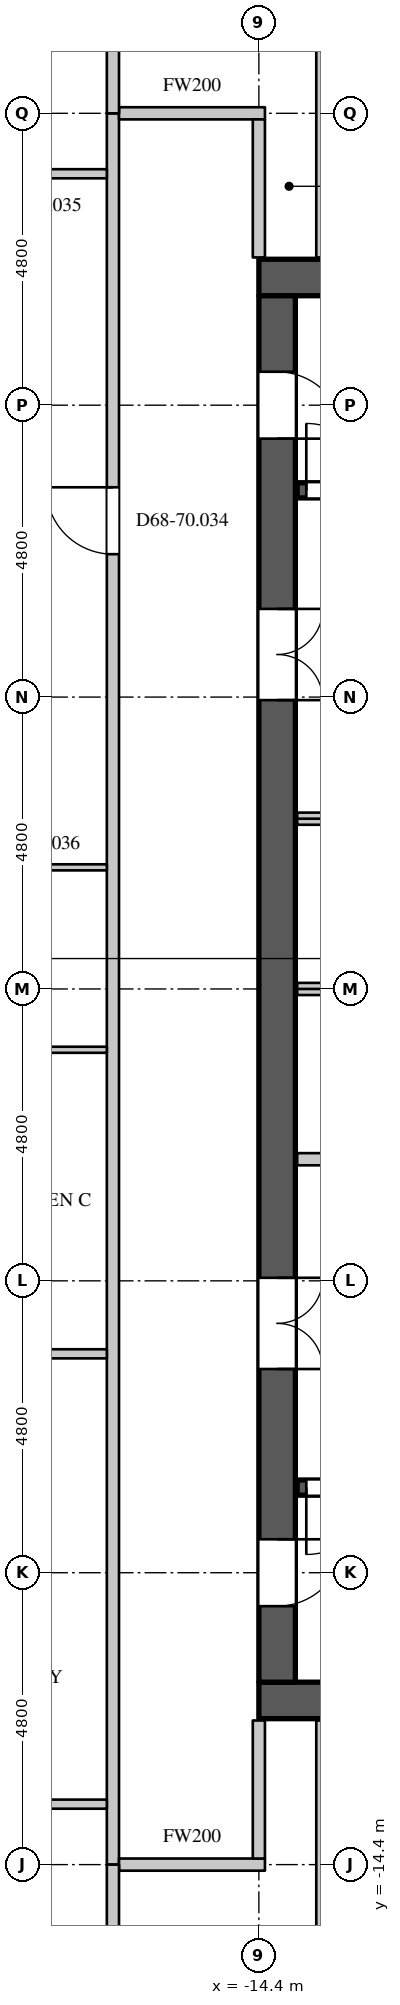
"""IFC4 building model, lengths in metres.
Left out: names, types, materials, properties, quantities, classifications, styles, units other than length and angle.
Written with IfcOpenShell. Run it as: python <this file> out.ifc"""

import sys

from ifc_helpers import new_model, si_unit, direction, frame, frame_2d, origin, place, context, subcontext, project, spatial, rectangle, extrude, element, fill, save


model = new_model("IFC4")
c1 = context("Model", 3, precision=1e-05, world=origin(), true_north=direction((0.0, 1.0)))
c2 = subcontext(c1, "Body", "Model", "MODEL_VIEW")
j1 = project(units=[si_unit("LENGTHUNIT", "METRE"), si_unit("PLANEANGLEUNIT", "RADIAN")], contexts=[c1])
p1 = place(None, origin())
s1 = spatial("IfcSite", under=j1, at=p1, CompositionType="ELEMENT")
p2 = place(p1, origin())
s2 = spatial("IfcBuilding", under=s1, at=p2, CompositionType="ELEMENT")
p3 = place(p2, frame((0.0, 0.0, 293.7)))
s3 = spatial("IfcBuildingStorey", under=s2, at=p3, CompositionType="ELEMENT", Elevation=293.7)
for number, where, z_axis, x_axis in (
    (1, (-14.4, 11.7, 0.0), (0.0, 0.0, 1.0), (1.0, 0.0, 0.0)),
    (2, (-14.4, -11.7, 0.0), (0.0, 0.0, 1.0), (1.0, 0.0, 0.0)),
):
    element("IfcWall", number, at=place(p3, frame(where, z_axis=z_axis, x_axis=x_axis)), inside=s3, PredefinedType="SHEAR", context=c2, shape_type="SweptSolid", body=[
        extrude(rectangle(XDim=28.8, YDim=0.6, at=frame_2d((14.4, 0.0))), origin(), (0.0, 0.0, 1.0), 4.2),
    ])
p4 = place(p3, frame((-14.1, -11.4, 0.0), z_axis=(0.0, 0.0, 1.0), x_axis=(0.0, 1.0, 0.0)))
e3 = element("IfcWall", 3, at=p4, inside=s3, PredefinedType="SHEAR", context=c2, shape_type="SweptSolid", body=[
    extrude(rectangle(XDim=22.8, YDim=0.6, at=frame_2d((11.4, 0.0))), origin(), (0.0, 0.0, 1.0), 4.2),
])
p5 = place(p4, frame((20.45, 0.0, 0.0)))
e4 = element("IfcOpeningElement", 4, at=p5, cuts=e3, PredefinedType="OPENING", context=c2, shape_type="SweptSolid", body=[
    extrude(rectangle(XDim=1.1, YDim=2.2, at=frame_2d((0.55, 1.1))), frame((0.0, 0.31, 0.0), z_axis=(0.0, -1.0, 0.0), x_axis=(1.0, 0.0, 0.0)), (0.0, 0.0, 1.0), 0.62),
])
p6 = place(p4, frame((1.25, 0.0, 0.0)))
e5 = element("IfcOpeningElement", 5, at=p6, cuts=e3, PredefinedType="OPENING", context=c2, shape_type="SweptSolid", body=[
    extrude(rectangle(XDim=1.1, YDim=2.2, at=frame_2d((0.55, 1.1))), frame((0.0, 0.31, 0.0), z_axis=(0.0, -1.0, 0.0), x_axis=(1.0, 0.0, 0.0)), (0.0, 0.0, 1.0), 0.62),
])
p7 = place(p4, frame((16.15, 0.0, 0.0)))
e6 = element("IfcOpeningElement", 6, at=p7, cuts=e3, PredefinedType="OPENING", context=c2, shape_type="SweptSolid", body=[
    extrude(rectangle(XDim=1.5, YDim=2.4, at=frame_2d((0.75, 1.2))), frame((0.0, 0.31, 0.0), z_axis=(0.0, -1.0, 0.0), x_axis=(1.0, 0.0, 0.0)), (0.0, 0.0, 1.0), 0.62),
])
p8 = place(p4, frame((5.15, 0.0, 0.0)))
e7 = element("IfcOpeningElement", 7, at=p8, cuts=e3, PredefinedType="OPENING", context=c2, shape_type="SweptSolid", body=[
    extrude(rectangle(XDim=1.5, YDim=2.4, at=frame_2d((0.75, 1.2))), frame((0.0, 0.31, 0.0), z_axis=(0.0, -1.0, 0.0), x_axis=(1.0, 0.0, 0.0)), (0.0, 0.0, 1.0), 0.62),
])
p9 = place(p3, frame((-16.8, -14.4, 0.0), z_axis=(0.0, 0.0, 1.0), x_axis=(0.0, 1.0, 0.0)))
e8 = element("IfcWall", 8, at=p9, inside=s3, PredefinedType="PARTITIONING", context=c2, shape_type="SweptSolid", body=[
    extrude(rectangle(XDim=28.8, YDim=0.2, at=frame_2d((14.4, 0.0))), origin(), (0.0, 0.0, 1.0), 3.95),
])
p10 = place(p9, frame((21.55, 0.0, 0.0)))
e9 = element("IfcOpeningElement", 9, at=p10, cuts=e8, PredefinedType="OPENING", context=c2, shape_type="SweptSolid", body=[
    extrude(rectangle(XDim=1.1, YDim=2.4, at=frame_2d((0.55, 1.2))), frame((0.0, 0.11, 0.0), z_axis=(0.0, -1.0, 0.0), x_axis=(1.0, 0.0, 0.0)), (0.0, 0.0, 1.0), 0.22),
])
for number, where, z_axis, x_axis in (
    (10, (-16.7, -14.4, 0.0), (0.0, 0.0, 1.0), (1.0, 0.0, 0.0)),
    (11, (-16.7, 14.4, 0.0), (0.0, 0.0, 1.0), (1.0, 0.0, 0.0)),
):
    element("IfcWall", number, at=place(p3, frame(where, z_axis=z_axis, x_axis=x_axis)), inside=s3, PredefinedType="PARTITIONING", context=c2, shape_type="SweptSolid", body=[
        extrude(rectangle(XDim=2.4, YDim=0.2, at=frame_2d((1.2, 0.0))), origin(), (0.0, 0.0, 1.0), 3.95),
    ])
for number, where, z_axis, x_axis in (
    (12, (-14.4, -14.3, 0.0), (0.0, 0.0, 1.0), (0.0, 1.0, 0.0)),
    (13, (-14.4, 12.03, 0.0), (0.0, 0.0, 1.0), (0.0, 1.0, 0.0)),
):
    element("IfcWall", number, at=place(p3, frame(where, z_axis=z_axis, x_axis=x_axis)), inside=s3, PredefinedType="PARTITIONING", context=c2, shape_type="SweptSolid", body=[
        extrude(rectangle(XDim=2.27, YDim=0.2, at=frame_2d((1.135, 0.0))), origin(), (0.0, 0.0, 1.0), 3.95),
    ])
p11 = place(p3, frame((-25.224, -13.406, 0.0), z_axis=(0.0, 0.0, 1.0), x_axis=(1.0, 0.0, 0.0)))
e14 = element("IfcWall", 14, at=p11, inside=s3, PredefinedType="PARTITIONING", context=c2, shape_type="SweptSolid", body=[
    extrude(rectangle(XDim=8.324, YDim=0.15, at=frame_2d((4.162, 0.0))), origin(), (0.0, 0.0, 1.0), 3.95),
])
p12 = place(p11, frame((1.793, 0.0, 0.0)))
e15 = element("IfcOpeningElement", 15, at=p12, cuts=e14, PredefinedType="OPENING", context=c2, shape_type="SweptSolid", body=[
    extrude(rectangle(XDim=1.5, YDim=2.2, at=frame_2d((0.75, 1.1))), frame((0.0, 0.085, 0.0), z_axis=(0.0, -1.0, 0.0), x_axis=(1.0, 0.0, 0.0)), (0.0, 0.0, 1.0), 0.17),
])
p13 = place(p3, frame((-25.224, 13.406, 0.0), z_axis=(0.0, 0.0, 1.0), x_axis=(1.0, 0.0, 0.0)))
e16 = element("IfcWall", 16, at=p13, inside=s3, PredefinedType="PARTITIONING", context=c2, shape_type="SweptSolid", body=[
    extrude(rectangle(XDim=8.324, YDim=0.15, at=frame_2d((4.162, 0.0))), origin(), (0.0, 0.0, 1.0), 3.95),
])
p14 = place(p13, frame((6.143, 0.0, 0.0)))
e17 = element("IfcOpeningElement", 17, at=p14, cuts=e16, PredefinedType="OPENING", context=c2, shape_type="SweptSolid", body=[
    extrude(rectangle(XDim=0.95, YDim=2.2, at=frame_2d((0.475, 1.1))), frame((0.0, 0.085, 0.0), z_axis=(0.0, -1.0, 0.0), x_axis=(1.0, 0.0, 0.0)), (0.0, 0.0, 1.0), 0.17),
])
p15 = place(p3, frame((-19.675, -6.0, 0.0), z_axis=(0.0, 0.0, 1.0), x_axis=(1.0, 0.0, 0.0)))
e18 = element("IfcWall", 18, at=p15, inside=s3, PredefinedType="PARTITIONING", context=c2, shape_type="SweptSolid", body=[
    extrude(rectangle(XDim=2.775, YDim=0.15, at=frame_2d((1.388, 0.0))), origin(), (0.0, 0.0, 1.0), 3.95),
])
for number, where, z_axis, x_axis in (
    (19, (-16.8, -19.803, 0.0), (0.0, 0.0, 1.0), (0.0, 1.0, 0.0)),
    (20, (-16.8, 14.4, 0.0), (0.0, 0.0, 1.0), (0.0, 1.0, 0.0)),
):
    element("IfcWall", number, at=place(p3, frame(where, z_axis=z_axis, x_axis=x_axis)), inside=s3, PredefinedType="PARTITIONING", context=c2, shape_type="SweptSolid", body=[
        extrude(rectangle(XDim=5.403, YDim=0.2, at=frame_2d((2.702, 0.0))), origin(), (0.0, 0.0, 1.0), 3.95),
    ])
p16 = place(p3, frame((-13.77, -2.8, 0.0), z_axis=(0.0, 0.0, 1.0), x_axis=(1.0, 0.0, 0.0)))
e21 = element("IfcWall", 21, at=p16, inside=s3, PredefinedType="PARTITIONING", context=c2, shape_type="SweptSolid", body=[
    extrude(rectangle(XDim=3.37, YDim=0.2, at=frame_2d((1.685, 0.0))), origin(), (0.0, 0.0, 1.0), 3.95),
])
p17 = place(p16, frame((1.35, 0.0, 0.0)))
e22 = element("IfcOpeningElement", 22, at=p17, cuts=e21, PredefinedType="OPENING", context=c2, shape_type="SweptSolid", body=[
    extrude(rectangle(XDim=0.6, YDim=2.0, at=frame_2d((0.3, 1.0))), frame((0.0, 0.11, 0.0), z_axis=(0.0, -1.0, 0.0), x_axis=(1.0, 0.0, 0.0)), (0.0, 0.0, 1.0), 0.22),
])
p18 = place(p3, frame((-13.77, 0.0, 0.0), z_axis=(0.0, 0.0, 1.0), x_axis=(1.0, 0.0, 0.0)))
e23 = element("IfcWall", 23, at=p18, inside=s3, PredefinedType="PARTITIONING", context=c2, shape_type="SweptSolid", body=[
    extrude(rectangle(XDim=21.57, YDim=0.2, at=frame_2d((10.785, 0.0))), origin(), (0.0, 0.0, 1.0), 3.95),
])
p19 = place(p3, frame((-13.77, 2.8, 0.0), z_axis=(0.0, 0.0, 1.0), x_axis=(1.0, 0.0, 0.0)))
e24 = element("IfcWall", 24, at=p19, inside=s3, PredefinedType="PARTITIONING", context=c2, shape_type="SweptSolid", body=[
    extrude(rectangle(XDim=5.95, YDim=0.2, at=frame_2d((2.975, 0.0))), origin(), (0.0, 0.0, 1.0), 3.95),
])
p20 = place(p19, frame((1.1, 0.0, 0.0)))
e25 = element("IfcOpeningElement", 25, at=p20, cuts=e24, PredefinedType="OPENING", context=c2, shape_type="SweptSolid", body=[
    extrude(rectangle(XDim=1.1, YDim=2.2, at=frame_2d((0.55, 1.1))), frame((0.0, 0.11, 0.0), z_axis=(0.0, -1.0, 0.0), x_axis=(1.0, 0.0, 0.0)), (0.0, 0.0, 1.0), 0.22),
])
p21 = place(p19, frame((4.1, 0.0, 0.0)))
e26 = element("IfcOpeningElement", 26, at=p21, cuts=e24, PredefinedType="OPENING", context=c2, shape_type="SweptSolid", body=[
    extrude(rectangle(XDim=1.1, YDim=2.2, at=frame_2d((0.55, 1.1))), frame((0.0, 0.11, 0.0), z_axis=(0.0, -1.0, 0.0), x_axis=(1.0, 0.0, 0.0)), (0.0, 0.0, 1.0), 0.22),
])
p22 = place(p3, frame((-13.77, -8.2, 0.0), z_axis=(0.0, 0.0, 1.0), x_axis=(1.0, 0.0, 0.0)))
e27 = element("IfcWall", 27, at=p22, inside=s3, PredefinedType="SHEAR", context=c2, shape_type="SweptSolid", body=[
    extrude(rectangle(XDim=8.495, YDim=0.25, at=frame_2d((4.248, 0.0))), origin(), (0.0, 0.0, 1.0), 3.95),
])
p23 = place(p22, frame((0.15, 0.0, 0.0)))
e28 = element("IfcOpeningElement", 28, at=p23, cuts=e27, PredefinedType="OPENING", context=c2, shape_type="SweptSolid", body=[
    extrude(rectangle(XDim=1.1, YDim=2.2, at=frame_2d((0.55, 1.1))), frame((0.0, 0.135, 0.0), z_axis=(0.0, -1.0, 0.0), x_axis=(1.0, 0.0, 0.0)), (0.0, 0.0, 1.0), 0.27),
])
p24 = place(p3, frame((-13.77, 8.2, 0.0), z_axis=(0.0, 0.0, 1.0), x_axis=(1.0, 0.0, 0.0)))
e29 = element("IfcWall", 29, at=p24, inside=s3, PredefinedType="SHEAR", context=c2, shape_type="SweptSolid", body=[
    extrude(rectangle(XDim=8.495, YDim=0.25, at=frame_2d((4.248, 0.0))), origin(), (0.0, 0.0, 1.0), 3.95),
])
p25 = place(p24, frame((0.15, 0.0, 0.0)))
e30 = element("IfcOpeningElement", 30, at=p25, cuts=e29, PredefinedType="OPENING", context=c2, shape_type="SweptSolid", body=[
    extrude(rectangle(XDim=1.1, YDim=2.2, at=frame_2d((0.55, 1.1))), frame((0.0, 0.135, 0.0), z_axis=(0.0, -1.0, 0.0), x_axis=(1.0, 0.0, 0.0)), (0.0, 0.0, 1.0), 0.27),
])
p26 = place(p3, frame((-20.625, -1.0, 0.0), z_axis=(0.0, 0.0, 1.0), x_axis=(1.0, 0.0, 0.0)))
e31 = element("IfcWall", 31, at=p26, inside=s3, PredefinedType="PARTITIONING", context=c2, shape_type="SweptSolid", body=[
    extrude(rectangle(XDim=3.725, YDim=0.1, at=frame_2d((1.863, 0.0))), origin(), (0.0, 0.0, 1.0), 3.95),
])
p27 = place(p3, frame((-20.65, 2.0, 0.0), z_axis=(0.0, 0.0, 1.0), x_axis=(1.0, 0.0, 0.0)))
e32 = element("IfcWall", 32, at=p27, inside=s3, PredefinedType="PARTITIONING", context=c2, shape_type="SweptSolid", body=[
    extrude(rectangle(XDim=3.75, YDim=0.1, at=frame_2d((1.875, 0.0))), origin(), (0.0, 0.0, 1.0), 3.95),
])
p28 = place(p27, frame((1.45, 0.0, 0.0)))
e33 = element("IfcOpeningElement", 33, at=p28, cuts=e32, PredefinedType="OPENING", context=c2, shape_type="SweptSolid", body=[
    extrude(rectangle(XDim=0.9, YDim=2.2, at=frame_2d((0.45, 1.1))), frame((0.0, 0.06, 0.0), z_axis=(0.0, -1.0, 0.0), x_axis=(1.0, 0.0, 0.0)), (0.0, 0.0, 1.0), 0.12),
])
for number, where, z_axis, x_axis in (
    (34, (-13.406, -16.6, 0.0), (0.0, 0.0, 1.0), (0.0, 1.0, 0.0)),
    (35, (-13.406, 12.03, 0.0), (0.0, 0.0, 1.0), (0.0, 1.0, 0.0)),
):
    element("IfcWall", number, at=place(p3, frame(where, z_axis=z_axis, x_axis=x_axis)), inside=s3, PredefinedType="PARTITIONING", context=c2, shape_type="SweptSolid", body=[
        extrude(rectangle(XDim=4.57, YDim=0.1, at=frame_2d((2.285, 0.0))), origin(), (0.0, 0.0, 1.0), 3.3),
    ])
p29 = place(p25, origin())
e36 = element("IfcDoor", 36, at=p29, inside=s3, OperationType="SINGLE_SWING_LEFT", PredefinedType="DOOR", context=c2, shape_type="SweptSolid", body=[
    extrude(rectangle(XDim=1.1, YDim=2.2, at=frame_2d((0.55, 1.1))), frame((0.0, 0.025, 0.0), z_axis=(0.0, -1.0, 0.0), x_axis=(1.0, 0.0, 0.0)), (0.0, 0.0, 1.0), 0.05),
])
fill(e30, e36)
p30 = place(p23, origin())
e37 = element("IfcDoor", 37, at=p30, inside=s3, OperationType="SINGLE_SWING_RIGHT", PredefinedType="DOOR", context=c2, shape_type="SweptSolid", body=[
    extrude(rectangle(XDim=1.1, YDim=2.2, at=frame_2d((0.55, 1.1))), frame((0.0, 0.025, 0.0), z_axis=(0.0, -1.0, 0.0), x_axis=(1.0, 0.0, 0.0)), (0.0, 0.0, 1.0), 0.05),
])
fill(e28, e37)
p31 = place(p5, origin())
e38 = element("IfcDoor", 38, at=p31, inside=s3, OperationType="SINGLE_SWING_RIGHT", PredefinedType="DOOR", context=c2, shape_type="SweptSolid", body=[
    extrude(rectangle(XDim=1.1, YDim=2.2, at=frame_2d((0.55, 1.1))), frame((0.0, -0.245, 0.0), z_axis=(0.0, -1.0, 0.0), x_axis=(1.0, 0.0, 0.0)), (0.0, 0.0, 1.0), 0.05),
])
fill(e4, e38)
p32 = place(p6, origin())
e39 = element("IfcDoor", 39, at=p32, inside=s3, OperationType="SINGLE_SWING_LEFT", PredefinedType="DOOR", context=c2, shape_type="SweptSolid", body=[
    extrude(rectangle(XDim=1.1, YDim=2.2, at=frame_2d((0.55, 1.1))), frame((0.0, -0.245, 0.0), z_axis=(0.0, -1.0, 0.0), x_axis=(1.0, 0.0, 0.0)), (0.0, 0.0, 1.0), 0.05),
])
fill(e5, e39)
p33 = place(p7, origin())
e40 = element("IfcDoor", 40, at=p33, inside=s3, OperationType="DOUBLE_DOOR_SINGLE_SWING", PredefinedType="DOOR", context=c2, shape_type="SweptSolid", body=[
    extrude(rectangle(XDim=1.5, YDim=2.4, at=frame_2d((0.75, 1.2))), frame((0.0, -0.245, 0.0), z_axis=(0.0, -1.0, 0.0), x_axis=(1.0, 0.0, 0.0)), (0.0, 0.0, 1.0), 0.05),
])
fill(e6, e40)
p34 = place(p8, origin())
e41 = element("IfcDoor", 41, at=p34, inside=s3, OperationType="DOUBLE_DOOR_SINGLE_SWING", PredefinedType="DOOR", context=c2, shape_type="SweptSolid", body=[
    extrude(rectangle(XDim=1.5, YDim=2.4, at=frame_2d((0.75, 1.2))), frame((0.0, -0.245, 0.0), z_axis=(0.0, -1.0, 0.0), x_axis=(1.0, 0.0, 0.0)), (0.0, 0.0, 1.0), 0.05),
])
fill(e7, e41)
p35 = place(p10, origin())
e42 = element("IfcDoor", 42, at=p35, inside=s3, OperationType="SINGLE_SWING_RIGHT", PredefinedType="DOOR", context=c2, shape_type="SweptSolid", body=[
    extrude(rectangle(XDim=1.1, YDim=2.4, at=frame_2d((0.55, 1.2))), frame((0.0, 0.025, 0.0), z_axis=(0.0, -1.0, 0.0), x_axis=(1.0, 0.0, 0.0)), (0.0, 0.0, 1.0), 0.05),
])
fill(e9, e42)
save(model, sys.argv[1])
